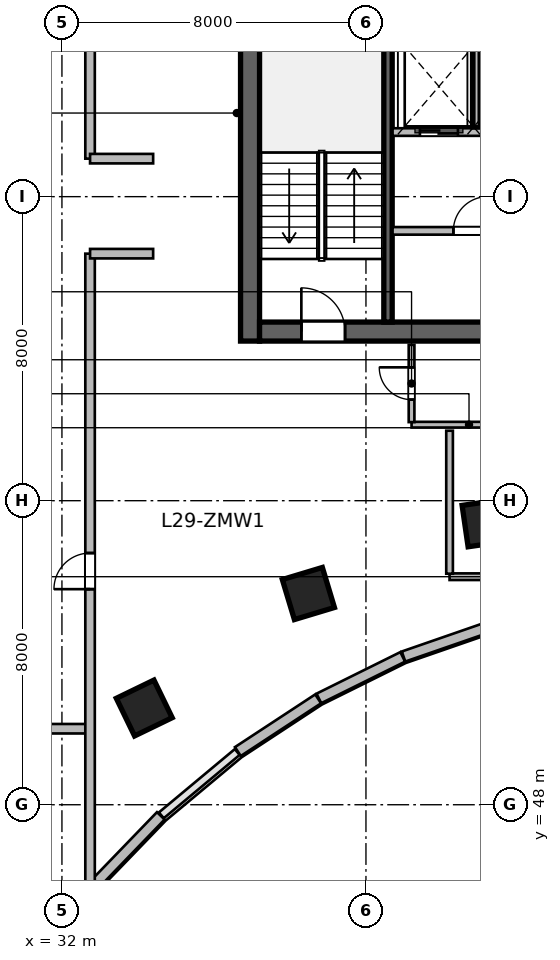
"""IFC4 building model, lengths in metres.
Left out: names, types, materials, properties, quantities, classifications, styles, units other than length and angle.
Written with IfcOpenShell. Run it as: python <this file> out.ifc"""

import sys

from ifc_helpers import new_model, si_unit, direction, frame, frame_2d, origin, origin_2d, place, context, subcontext, project, spatial, rectangle, extrude, source, transform, mapped, element, fill, save


model = new_model("IFC4")
c1 = context("Model", 3, precision=1e-05, world=origin(), true_north=direction((0.0, 1.0)))
c2 = subcontext(c1, "Body", "Model", "MODEL_VIEW")
j1 = project(units=[si_unit("LENGTHUNIT", "METRE"), si_unit("PLANEANGLEUNIT", "RADIAN")], contexts=[c1])
p1 = place(None, origin())
s1 = spatial("IfcSite", under=j1, at=p1, CompositionType="ELEMENT")
p2 = place(p1, origin())
s2 = spatial("IfcBuilding", under=s1, at=p2, CompositionType="ELEMENT")
p3 = place(p2, frame((0.0, 0.0, 123.3)))
s3 = spatial("IfcBuildingStorey", under=s2, at=p3, CompositionType="ELEMENT", Elevation=123.3)
m1 = source(origin(), c2, "Body", "SweptSolid", [
    extrude(rectangle(XDim=12.0, YDim=0.5, at=frame_2d((6.0, 0.0))), origin(), (0.0, 0.0, 1.0), 3.9),
])
p4 = place(p3, frame((36.95, 60.2, 0.0), z_axis=(0.0, 0.0, 1.0), x_axis=(0.0, 1.0, 0.0)))
e1 = element("IfcWall", 1, at=p4, inside=s3, PredefinedType="SHEAR", context=c2, shape_type="MappedRepresentation", body=[
    mapped(m1, transform((0.0, 0.0, 0.0), scale=1.0)),
])
m2 = source(origin(), c2, "Body", "SweptSolid", [
    extrude(rectangle(XDim=21.6, YDim=0.5, at=frame_2d((10.8, 0.0))), origin(), (0.0, 0.0, 1.0), 3.9),
])
p5 = place(p3, frame((37.2, 60.45, 0.0), z_axis=(0.0, 0.0, 1.0), x_axis=(1.0, 0.0, 0.0)))
e2 = element("IfcWall", 2, at=p5, inside=s3, PredefinedType="SHEAR", context=c2, shape_type="MappedRepresentation", body=[
    mapped(m2, transform((0.0, 0.0, 0.0), scale=1.0)),
])
p6 = place(p5, frame((1.1, 0.0, 0.0)))
e3 = element("IfcOpeningElement", 3, at=p6, cuts=e2, PredefinedType="OPENING", context=c2, shape_type="SweptSolid", body=[
    extrude(rectangle(XDim=1.15, YDim=2.15, at=frame_2d((0.575, 1.075))), frame((0.0, 0.26, 0.0), z_axis=(0.0, -1.0, 0.0), x_axis=(1.0, 0.0, 0.0)), (0.0, 0.0, 1.0), 0.52),
])
p7 = place(p5, frame((19.5, 0.0, 0.0)))
e4 = element("IfcOpeningElement", 4, at=p7, cuts=e2, PredefinedType="OPENING", context=c2, shape_type="SweptSolid", body=[
    extrude(rectangle(XDim=0.9, YDim=2.1, at=frame_2d((0.45, 1.05))), frame((0.0, 0.26, 0.0), z_axis=(0.0, -1.0, 0.0), x_axis=(1.0, 0.0, 0.0)), (0.0, 0.0, 1.0), 0.52),
])
p8 = place(p5, frame((12.02, 0.0, 0.0)))
e5 = element("IfcOpeningElement", 5, at=p8, cuts=e2, PredefinedType="OPENING", context=c2, shape_type="SweptSolid", body=[
    extrude(rectangle(XDim=1.6, YDim=2.15, at=frame_2d((0.8, 1.075))), frame((0.0, 0.26, 0.0), z_axis=(0.0, -1.0, 0.0), x_axis=(1.0, 0.0, 0.0)), (0.0, 0.0, 1.0), 0.52),
])
m3 = source(origin(), c2, "Body", "SweptSolid", [
    extrude(rectangle(XDim=11.0, YDim=0.22, at=frame_2d((5.5, 0.0))), origin(), (0.0, 0.0, 1.0), 3.9),
])
p9 = place(p3, frame((40.58, 60.7, 0.0), z_axis=(0.0, 0.0, 1.0), x_axis=(0.0, 1.0, 0.0)))
e6 = element("IfcWall", 6, at=p9, inside=s3, PredefinedType="SHEAR", context=c2, shape_type="MappedRepresentation", body=[
    mapped(m3, transform((0.0, 0.0, 0.0), scale=1.0)),
])
m4 = source(origin(), c2, "Body", "SweptSolid", [
    extrude(rectangle(XDim=1.1, YDim=1.1, at=origin_2d()), origin(), (0.0, 0.0, 1.0), 3.9),
])
for number, where, z_axis, x_axis in (
    (7, (34.166, 50.545, 0.0), (0.0, 0.0, 1.0), (-0.436, 0.9, 0.0)),
    (8, (38.485, 53.558, 0.0), (0.0, 0.0, 1.0), (-0.289, 0.957, 0.0)),
    (9, (43.154, 55.411, 0.0), (0.0, 0.0, 1.0), (-0.143, 0.99, 0.0)),
):
    element("IfcColumn", number, at=place(p3, frame(where, z_axis=z_axis, x_axis=x_axis)), inside=s3, PredefinedType="COLUMN", context=c2, shape_type="MappedRepresentation", body=[
        mapped(m4, transform((0.0, 0.0, 0.0), scale=1.0)),
    ])
m5 = source(origin(), c2, "Body", "SweptSolid", [
    extrude(rectangle(XDim=2.411, YDim=0.28, at=frame_2d((1.205, 0.0))), origin(), (0.0, 0.0, 1.0), 3.65),
])
p10 = place(p3, frame((43.266, 52.689, 0.0), z_axis=(0.0, 0.0, 1.0), x_axis=(-0.944880068161, -0.327416640982, 0.0)))
e10 = element("IfcWall", 10, at=p10, inside=s3, PredefinedType="SOLIDWALL", context=c2, shape_type="MappedRepresentation", body=[
    mapped(m5, transform((0.0, 0.0, 0.0), scale=1.0)),
])
m6 = source(origin(), c2, "Body", "SweptSolid", [
    extrude(rectangle(XDim=2.462, YDim=0.28, at=frame_2d((1.231, 0.0))), origin(), (0.0, 0.0, 1.0), 3.65),
])
p11 = place(p3, frame((40.967, 51.891, 0.0), z_axis=(0.0, 0.0, 1.0), x_axis=(-0.8959882207, -0.444077817917, 0.0)))
e11 = element("IfcWall", 11, at=p11, inside=s3, PredefinedType="SOLIDWALL", context=c2, shape_type="MappedRepresentation", body=[
    mapped(m6, transform((0.0, 0.0, 0.0), scale=1.0)),
])
m7 = source(origin(), c2, "Body", "SweptSolid", [
    extrude(rectangle(XDim=2.527, YDim=0.28, at=frame_2d((1.264, 0.0))), origin(), (0.0, 0.0, 1.0), 3.65),
])
p12 = place(p3, frame((38.742, 50.786, 0.0), z_axis=(0.0, 0.0, 1.0), x_axis=(-0.836011905051, -0.548711303523, 0.0)))
e12 = element("IfcWall", 12, at=p12, inside=s3, PredefinedType="SOLIDWALL", context=c2, shape_type="MappedRepresentation", body=[
    mapped(m7, transform((0.0, 0.0, 0.0), scale=1.0)),
])
m8 = source(origin(), c2, "Body", "SweptSolid", [
    extrude(rectangle(XDim=2.68, YDim=0.28, at=frame_2d((1.34, 0.0))), origin(), (0.0, 0.0, 1.0), 3.65),
])
p13 = place(p3, frame((34.601, 47.708, 0.0), z_axis=(0.0, 0.0, 1.0), x_axis=(-0.694561996568, -0.719432855049, 0.0)))
e13 = element("IfcWall", 13, at=p13, inside=s3, PredefinedType="SOLIDWALL", context=c2, shape_type="MappedRepresentation", body=[
    mapped(m8, transform((0.0, 0.0, 0.0), scale=1.0)),
])
m9 = source(origin(), c2, "Body", "SweptSolid", [
    extrude(rectangle(XDim=8.02, YDim=0.2, at=frame_2d((4.01, 0.0))), origin(), (0.0, 0.0, 1.0), 3.65),
])
p14 = place(p3, frame((40.7, 63.1, 0.0), z_axis=(0.0, 0.0, 1.0), x_axis=(1.0, 0.0, 0.0)))
e14 = element("IfcWall", 14, at=p14, inside=s3, PredefinedType="SOLIDWALL", context=c2, shape_type="MappedRepresentation", body=[
    mapped(m9, transform((0.0, 0.0, 0.0), scale=1.0)),
])
p15 = place(p14, frame((1.6, 0.0, 0.0)))
e15 = element("IfcOpeningElement", 15, at=p15, cuts=e14, PredefinedType="OPENING", context=c2, shape_type="SweptSolid", body=[
    extrude(rectangle(XDim=0.9, YDim=2.1, at=frame_2d((0.45, 1.05))), frame((0.0, 0.11, 0.0), z_axis=(0.0, -1.0, 0.0), x_axis=(1.0, 0.0, 0.0)), (0.0, 0.0, 1.0), 0.22),
])
p16 = place(p14, frame((5.54, 0.0, 0.0)))
e16 = element("IfcOpeningElement", 16, at=p16, cuts=e14, PredefinedType="OPENING", context=c2, shape_type="SweptSolid", body=[
    extrude(rectangle(XDim=0.9, YDim=2.1, at=frame_2d((0.45, 1.05))), frame((0.0, 0.11, 0.0), z_axis=(0.0, -1.0, 0.0), x_axis=(1.0, 0.0, 0.0)), (0.0, 0.0, 1.0), 0.22),
])
m10 = source(origin(), c2, "Body", "SweptSolid", [
    extrude(rectangle(XDim=8.8, YDim=0.2, at=frame_2d((4.4, 0.0))), origin(), (0.0, 0.0, 1.0), 3.65),
])
p17 = place(p3, frame((40.7, 65.7, 0.0), z_axis=(0.0, 0.0, 1.0), x_axis=(1.0, 0.0, 0.0)))
e17 = element("IfcWall", 17, at=p17, inside=s3, PredefinedType="SOLIDWALL", context=c2, shape_type="MappedRepresentation", body=[
    mapped(m10, transform((0.0, 0.0, 0.0), scale=1.0)),
])
p18 = place(p17, frame((0.72, 0.0, 0.0)))
e18 = element("IfcOpeningElement", 18, at=p18, cuts=e17, PredefinedType="OPENING", context=c2, shape_type="SweptSolid", body=[
    extrude(rectangle(XDim=1.0, YDim=2.15, at=frame_2d((0.5, 1.075))), frame((0.0, 0.11, 0.0), z_axis=(0.0, -1.0, 0.0), x_axis=(1.0, 0.0, 0.0)), (0.0, 0.0, 1.0), 0.22),
])
p19 = place(p17, frame((2.62, 0.0, 0.0)))
e19 = element("IfcOpeningElement", 19, at=p19, cuts=e17, PredefinedType="OPENING", context=c2, shape_type="SweptSolid", body=[
    extrude(rectangle(XDim=1.0, YDim=2.15, at=frame_2d((0.5, 1.075))), frame((0.0, 0.11, 0.0), z_axis=(0.0, -1.0, 0.0), x_axis=(1.0, 0.0, 0.0)), (0.0, 0.0, 1.0), 0.22),
])
p20 = place(p17, frame((4.55, 0.0, 0.0)))
e20 = element("IfcOpeningElement", 20, at=p20, cuts=e17, PredefinedType="OPENING", context=c2, shape_type="SweptSolid", body=[
    extrude(rectangle(XDim=1.0, YDim=2.15, at=frame_2d((0.5, 1.075))), frame((0.0, 0.11, 0.0), z_axis=(0.0, -1.0, 0.0), x_axis=(1.0, 0.0, 0.0)), (0.0, 0.0, 1.0), 0.22),
])
p21 = place(p17, frame((6.55, 0.0, 0.0)))
e21 = element("IfcOpeningElement", 21, at=p21, cuts=e17, PredefinedType="OPENING", context=c2, shape_type="SweptSolid", body=[
    extrude(rectangle(XDim=1.0, YDim=2.15, at=frame_2d((0.5, 1.075))), frame((0.0, 0.11, 0.0), z_axis=(0.0, -1.0, 0.0), x_axis=(1.0, 0.0, 0.0)), (0.0, 0.0, 1.0), 0.22),
])
m11 = source(origin(), c2, "Body", "SweptSolid", [
    extrude(rectangle(XDim=2.4, YDim=0.2, at=frame_2d((1.2, 0.0))), origin(), (0.0, 0.0, 1.0), 3.65),
])
p22 = place(p3, frame((42.87, 65.8, 0.0), z_axis=(0.0, 0.0, 1.0), x_axis=(0.0, 1.0, 0.0)))
e22 = element("IfcWall", 22, at=p22, inside=s3, PredefinedType="SOLIDWALL", context=c2, shape_type="MappedRepresentation", body=[
    mapped(m11, transform((0.0, 0.0, 0.0), scale=1.0)),
])
m12 = source(origin(), c2, "Body", "SweptSolid", [
    extrude(rectangle(XDim=5.4, YDim=0.15, at=frame_2d((2.7, 0.0))), origin(), (0.0, 0.0, 1.0), 3.65),
])
p23 = place(p3, frame((41.2, 58.0, 0.0), z_axis=(0.0, 0.0, 1.0), x_axis=(1.0, 0.0, 0.0)))
e23 = element("IfcWall", 23, at=p23, inside=s3, PredefinedType="PARTITIONING", context=c2, shape_type="MappedRepresentation", body=[
    mapped(m12, transform((0.0, 0.0, 0.0), scale=1.0)),
])
p24 = place(p23, frame((2.25, 0.0, 0.0)))
e24 = element("IfcOpeningElement", 24, at=p24, cuts=e23, PredefinedType="OPENING", context=c2, shape_type="SweptSolid", body=[
    extrude(rectangle(XDim=0.9, YDim=2.08, at=frame_2d((0.45, 1.04))), frame((0.0, 0.085, 0.0), z_axis=(0.0, -1.0, 0.0), x_axis=(1.0, 0.0, 0.0)), (0.0, 0.0, 1.0), 0.17),
])
m13 = source(origin(), c2, "Body", "SweptSolid", [
    extrude(rectangle(XDim=2.033, YDim=0.15, at=frame_2d((1.016, 0.0))), origin(), (0.0, 0.0, 1.0), 3.65),
])
p25 = place(p3, frame((41.2, 58.067, 0.0), z_axis=(0.0, 0.0, 1.0), x_axis=(0.0, 1.0, 0.0)))
e25 = element("IfcWall", 25, at=p25, inside=s3, PredefinedType="PARTITIONING", context=c2, shape_type="MappedRepresentation", body=[
    mapped(m13, transform((0.0, 0.0, 0.0), scale=1.0)),
])
p26 = place(p25, frame((0.591, 0.0, 0.0)))
e26 = element("IfcOpeningElement", 26, at=p26, cuts=e25, PredefinedType="OPENING", context=c2, shape_type="SweptSolid", body=[
    extrude(rectangle(XDim=0.85, YDim=2.1, at=frame_2d((0.425, 1.05))), frame((0.0, 0.085, 0.0), z_axis=(0.0, -1.0, 0.0), x_axis=(1.0, 0.0, 0.0)), (0.0, 0.0, 1.0), 0.17),
])
m14 = source(origin(), c2, "Body", "SweptSolid", [
    extrude(rectangle(XDim=4.176, YDim=0.175, at=frame_2d((2.088, 0.0))), origin(), (0.0, 0.0, 1.0), 3.65),
])
p27 = place(p3, frame((42.2, 54.0, 0.0), z_axis=(0.0, 0.0, 1.0), x_axis=(1.0, 0.0, 0.0)))
e27 = element("IfcWall", 27, at=p27, inside=s3, PredefinedType="PARTITIONING", context=c2, shape_type="MappedRepresentation", body=[
    mapped(m14, transform((0.0, 0.0, 0.0), scale=1.0)),
])
m15 = source(origin(), c2, "Body", "SweptSolid", [
    extrude(rectangle(XDim=3.763, YDim=0.175, at=frame_2d((1.881, 0.0))), origin(), (0.0, 0.0, 1.0), 3.65),
])
p28 = place(p3, frame((42.2, 54.079, 0.0), z_axis=(0.0, 0.0, 1.0), x_axis=(0.0, 1.0, 0.0)))
e28 = element("IfcWall", 28, at=p28, inside=s3, PredefinedType="PARTITIONING", context=c2, shape_type="MappedRepresentation", body=[
    mapped(m15, transform((0.0, 0.0, 0.0), scale=1.0)),
])
m16 = source(origin(), c2, "Body", "SweptSolid", [
    extrude(rectangle(XDim=2.5, YDim=0.25, at=frame_2d((1.25, 0.0))), origin(), (0.0, 0.0, 1.0), 3.65),
])
p29 = place(p3, frame((30.2, 50.0, 0.0), z_axis=(0.0, 0.0, 1.0), x_axis=(1.0, 0.0, 0.0)))
e29 = element("IfcWall", 29, at=p29, inside=s3, PredefinedType="PARTITIONING", context=c2, shape_type="MappedRepresentation", body=[
    mapped(m16, transform((0.0, 0.0, 0.0), scale=1.0)),
])
m17 = source(origin(), c2, "Body", "SweptSolid", [
    extrude(rectangle(XDim=16.706, YDim=0.25, at=frame_2d((8.353, 0.0))), origin(), (0.0, 0.0, 1.0), 2.942),
])
p30 = place(p3, frame((32.74, 45.794, 0.0), z_axis=(0.0, 0.0, 1.0), x_axis=(0.0, 1.0, 0.0)))
e30 = element("IfcWall", 30, at=p30, inside=s3, PredefinedType="PARTITIONING", context=c2, shape_type="MappedRepresentation", body=[
    mapped(m17, transform((0.0, 0.0, 0.0), scale=1.0)),
])
p31 = place(p30, frame((7.878, 0.0, 0.0)))
e31 = element("IfcOpeningElement", 31, at=p31, cuts=e30, PredefinedType="OPENING", context=c2, shape_type="SweptSolid", body=[
    extrude(rectangle(XDim=0.95, YDim=2.1, at=frame_2d((0.475, 1.05))), frame((0.0, 0.135, 0.0), z_axis=(0.0, -1.0, 0.0), x_axis=(1.0, 0.0, 0.0)), (0.0, 0.0, 1.0), 0.27),
])
m18 = source(origin(), c2, "Body", "SweptSolid", [
    extrude(rectangle(XDim=1.66, YDim=0.25, at=frame_2d((0.83, 0.0))), origin(), (0.0, 0.0, 1.0), 3.65),
])
p32 = place(p3, frame((32.74, 62.5, 0.0), z_axis=(0.0, 0.0, 1.0), x_axis=(1.0, 0.0, 0.0)))
e32 = element("IfcWall", 32, at=p32, inside=s3, PredefinedType="PARTITIONING", context=c2, shape_type="MappedRepresentation", body=[
    mapped(m18, transform((0.0, 0.0, 0.0), scale=1.0)),
])
m19 = source(origin(), c2, "Body", "SweptSolid", [
    extrude(rectangle(XDim=10.224, YDim=0.25, at=frame_2d((5.112, 0.0))), origin(), (0.0, 0.0, 1.0), 3.65),
])
p33 = place(p3, frame((32.74, 65.0, 0.0), z_axis=(0.0, 0.0, 1.0), x_axis=(0.0, 1.0, 0.0)))
e33 = element("IfcWall", 33, at=p33, inside=s3, PredefinedType="PARTITIONING", context=c2, shape_type="MappedRepresentation", body=[
    mapped(m19, transform((0.0, 0.0, 0.0), scale=1.0)),
])
p34 = place(p33, frame((3.65, 0.0, 0.0)))
e34 = element("IfcOpeningElement", 34, at=p34, cuts=e33, PredefinedType="OPENING", context=c2, shape_type="SweptSolid", body=[
    extrude(rectangle(XDim=0.95, YDim=2.1, at=frame_2d((0.475, 1.05))), frame((0.0, 0.135, 0.0), z_axis=(0.0, -1.0, 0.0), x_axis=(1.0, 0.0, 0.0)), (0.0, 0.0, 1.0), 0.27),
])
p35 = place(p3, frame((32.74, 65.0, 0.0), z_axis=(0.0, 0.0, 1.0), x_axis=(1.0, 0.0, 0.0)))
e35 = element("IfcWall", 35, at=p35, inside=s3, PredefinedType="PARTITIONING", context=c2, shape_type="MappedRepresentation", body=[
    mapped(m18, transform((0.0, 0.0, 0.0), scale=1.0)),
])
m20 = source(origin(), c2, "Body", "SweptSolid", [
    extrude(rectangle(XDim=1.15, YDim=2.15, at=frame_2d((0.575, 1.075))), frame((0.0, 0.025, 0.0), z_axis=(0.0, -1.0, 0.0), x_axis=(1.0, 0.0, 0.0)), (0.0, 0.0, 1.0), 0.05),
])
p36 = place(p6, origin())
e36 = element("IfcDoor", 36, at=p36, inside=s3, OperationType="SINGLE_SWING_LEFT", PredefinedType="DOOR", context=c2, shape_type="MappedRepresentation", body=[
    mapped(m20, transform((0.0, 0.0, 0.0), scale=1.0)),
])
fill(e3, e36)
m21 = source(origin(), c2, "Body", "SweptSolid", [
    extrude(rectangle(XDim=0.9, YDim=2.1, at=frame_2d((0.45, 1.05))), frame((0.0, 0.025, 0.0), z_axis=(0.0, -1.0, 0.0), x_axis=(1.0, 0.0, 0.0)), (0.0, 0.0, 1.0), 0.05),
])
p37 = place(p15, origin())
e37 = element("IfcDoor", 37, at=p37, inside=s3, OperationType="SINGLE_SWING_RIGHT", PredefinedType="DOOR", context=c2, shape_type="MappedRepresentation", body=[
    mapped(m21, transform((0.0, 0.0, 0.0), scale=1.0)),
])
fill(e15, e37)
m22 = source(origin(), c2, "Body", "SweptSolid", [
    extrude(rectangle(XDim=1.0, YDim=2.15, at=frame_2d((0.5, 1.075))), frame((0.0, 0.025, 0.0), z_axis=(0.0, -1.0, 0.0), x_axis=(1.0, 0.0, 0.0)), (0.0, 0.0, 1.0), 0.05),
])
p38 = place(p18, origin())
e38 = element("IfcDoor", 38, at=p38, inside=s3, OperationType="DOUBLE_DOOR_SLIDING", PredefinedType="DOOR", context=c2, shape_type="MappedRepresentation", body=[
    mapped(m22, transform((0.0, 0.0, 0.0), scale=1.0)),
])
fill(e18, e38)
m23 = source(origin(), c2, "Body", "SweptSolid", [
    extrude(rectangle(XDim=0.85, YDim=2.1, at=frame_2d((0.425, 1.05))), frame((0.0, 0.025, 0.0), z_axis=(0.0, -1.0, 0.0), x_axis=(1.0, 0.0, 0.0)), (0.0, 0.0, 1.0), 0.05),
])
p39 = place(p26, origin())
e39 = element("IfcDoor", 39, at=p39, inside=s3, OperationType="SINGLE_SWING_RIGHT", PredefinedType="DOOR", context=c2, shape_type="MappedRepresentation", body=[
    mapped(m23, transform((0.0, 0.0, 0.0), scale=1.0)),
])
fill(e26, e39)
m24 = source(origin(), c2, "Body", "SweptSolid", [
    extrude(rectangle(XDim=0.95, YDim=2.1, at=frame_2d((0.475, 1.05))), frame((0.0, 0.025, 0.0), z_axis=(0.0, -1.0, 0.0), x_axis=(1.0, 0.0, 0.0)), (0.0, 0.0, 1.0), 0.05),
])
p40 = place(p31, origin())
e40 = element("IfcDoor", 40, at=p40, inside=s3, OperationType="SINGLE_SWING_LEFT", PredefinedType="DOOR", context=c2, shape_type="MappedRepresentation", body=[
    mapped(m24, transform((0.0, 0.0, 0.0), scale=1.0)),
])
fill(e31, e40)
save(model, sys.argv[1])
